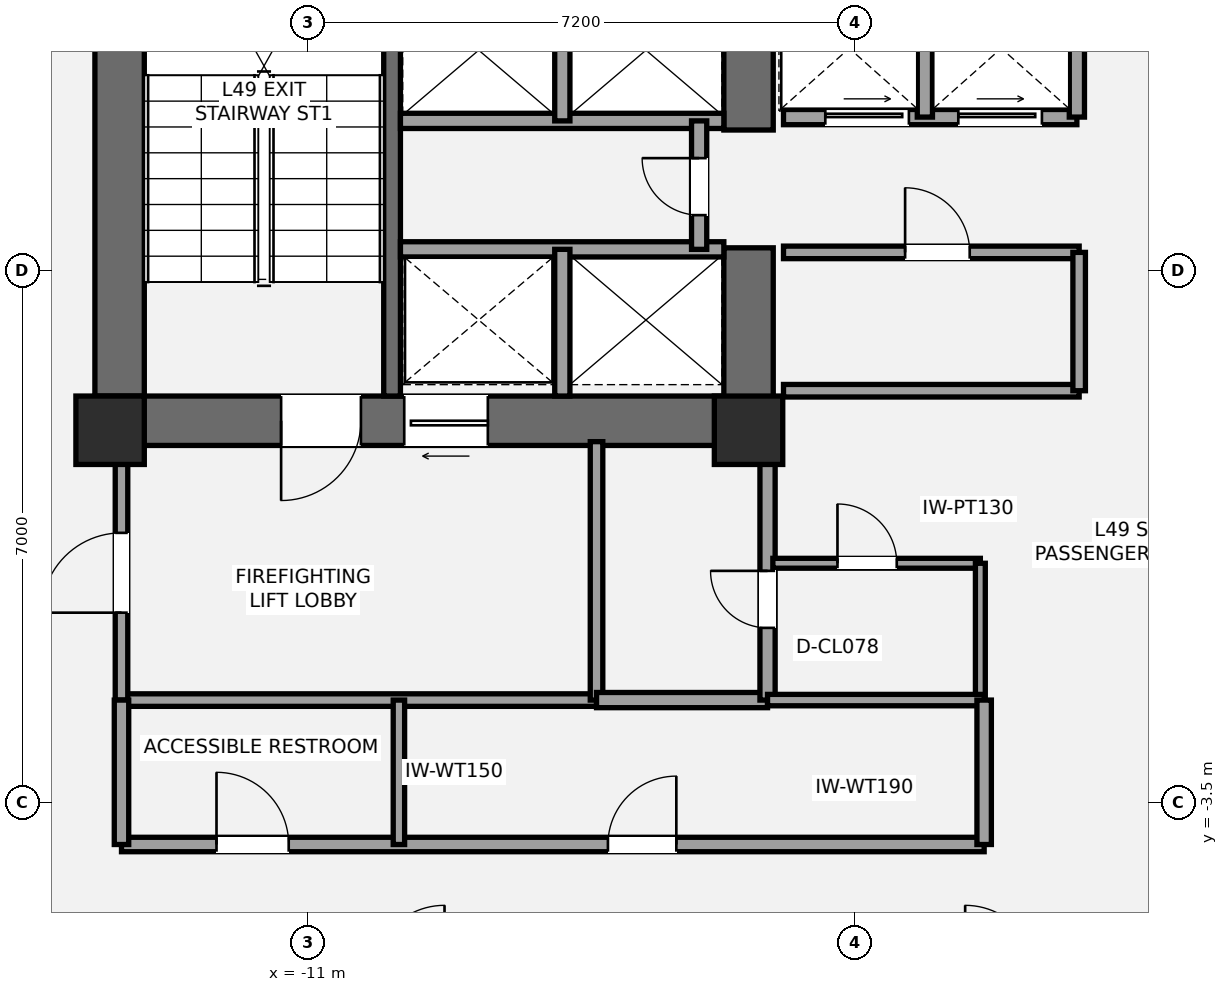
"""IFC4 building model, lengths in metres.
Left out: names, types, materials, properties, quantities, classifications, styles, units other than length and angle.
Written with IfcOpenShell. Run it as: python <this file> out.ifc"""

import sys

from ifc_helpers import new_model, si_unit, direction, frame, frame_2d, origin, origin_2d, place, context, subcontext, project, spatial, rectangle, extrude, element, fill, save


model = new_model("IFC4")
c1 = context("Model", 3, precision=1e-05, world=origin(), true_north=direction((0.0, 1.0)))
c2 = subcontext(c1, "Body", "Model", "MODEL_VIEW")
j1 = project(units=[si_unit("LENGTHUNIT", "METRE"), si_unit("PLANEANGLEUNIT", "RADIAN")], contexts=[c1])
p1 = place(None, origin())
s1 = spatial("IfcSite", under=j1, at=p1, CompositionType="ELEMENT")
p2 = place(p1, origin())
s2 = spatial("IfcBuilding", under=s1, at=p2, CompositionType="ELEMENT")
p3 = place(p2, frame((0.0, 0.0, 179.0)))
s3 = spatial("IfcBuildingStorey", under=s2, at=p3, CompositionType="ELEMENT", Elevation=179.0)
p4 = place(p3, frame((-13.475, 1.2, 0.0), z_axis=(0.0, 0.0, 1.0), x_axis=(0.0, 1.0, 0.0)))
e1 = element("IfcWall", 1, at=p4, inside=s3, PredefinedType="SHEAR", context=c2, shape_type="SweptSolid", body=[
    extrude(rectangle(XDim=8.45, YDim=0.65, at=frame_2d((4.225, 0.0))), origin(), (0.0, 0.0, 1.0), 3.2),
])
p5 = place(p3, frame((-4.875, 1.525, 0.0), z_axis=(0.0, 0.0, 1.0), x_axis=(-1.0, 0.0, 0.0)))
e2 = element("IfcWall", 2, at=p5, inside=s3, PredefinedType="SHEAR", context=c2, shape_type="SweptSolid", body=[
    extrude(rectangle(XDim=8.925, YDim=0.65, at=frame_2d((4.462, 0.0))), origin(), (0.0, 0.0, 1.0), 3.2),
])
p6 = place(p5, frame((5.425, 0.0, 0.0)))
e3 = element("IfcOpeningElement", 3, at=p6, cuts=e2, PredefinedType="OPENING", context=c2, shape_type="SweptSolid", body=[
    extrude(rectangle(XDim=1.05, YDim=2.15, at=frame_2d((0.525, 1.075))), frame((0.0, 0.335, 0.0), z_axis=(0.0, -1.0, 0.0), x_axis=(1.0, 0.0, 0.0)), (0.0, 0.0, 1.0), 0.67),
])
p7 = place(p5, frame((3.755, 0.0, 0.0)))
e4 = element("IfcOpeningElement", 4, at=p7, cuts=e2, PredefinedType="OPENING", context=c2, shape_type="SweptSolid", body=[
    extrude(rectangle(XDim=1.1, YDim=2.2, at=frame_2d((0.55, 1.1))), frame((0.0, 0.335, 0.0), z_axis=(0.0, -1.0, 0.0), x_axis=(1.0, 0.0, 0.0)), (0.0, 0.0, 1.0), 0.67),
])
p8 = place(p3, frame((-5.2, 1.2, 0.0), z_axis=(0.0, 0.0, 1.0), x_axis=(0.0, 1.0, 0.0)))
e5 = element("IfcWall", 5, at=p8, inside=s3, PredefinedType="SHEAR", context=c2, shape_type="SweptSolid", body=[
    extrude(rectangle(XDim=2.6, YDim=0.65, at=frame_2d((1.3, 0.0))), origin(), (0.0, 0.0, 1.0), 3.2),
])
p9 = place(p3, frame((-5.2, 5.35, 0.0), z_axis=(0.0, 0.0, 1.0), x_axis=(0.0, 1.0, 0.0)))
e6 = element("IfcWall", 6, at=p9, inside=s3, PredefinedType="SHEAR", context=c2, shape_type="SweptSolid", body=[
    extrude(rectangle(XDim=2.0, YDim=0.65, at=frame_2d((1.0, 0.0))), origin(), (0.0, 0.0, 1.0), 3.2),
])
p10 = place(p3, frame((-9.89, 1.85, 0.0), z_axis=(0.0, 0.0, 1.0), x_axis=(0.0, 1.0, 0.0)))
e7 = element("IfcWall", 7, at=p10, inside=s3, PredefinedType="SHEAR", context=c2, shape_type="SweptSolid", body=[
    extrude(rectangle(XDim=7.15, YDim=0.22, at=frame_2d((3.575, 0.0))), origin(), (0.0, 0.0, 1.0), 3.2),
])
for number, where, z_axis, x_axis in (
    (8, (-13.6, 1.4, 0.0), (0.0, 0.0, 1.0), (1.0, 0.0, 0.0)),
    (9, (-5.2, 1.4, 0.0), (0.0, 0.0, 1.0), (1.0, 0.0, 0.0)),
):
    element("IfcColumn", number, at=place(p3, frame(where, z_axis=z_axis, x_axis=x_axis)), inside=s3, PredefinedType="COLUMN", context=c2, shape_type="SweptSolid", body=[
        extrude(rectangle(XDim=0.9, YDim=0.9, at=origin_2d()), origin(), (0.0, 0.0, 1.0), 3.2),
    ])
p11 = place(p3, frame((-13.45, -2.15, 0.0), z_axis=(0.0, 0.0, 1.0), x_axis=(1.0, 0.0, 0.0)))
e10 = element("IfcWall", 10, at=p11, inside=s3, PredefinedType="PARTITIONING", context=c2, shape_type="SweptSolid", body=[
    extrude(rectangle(XDim=6.25, YDim=0.165, at=frame_2d((3.125, 0.0))), origin(), (0.0, 0.0, 1.0), 3.02),
])
p12 = place(p3, frame((-13.45, -2.15, 0.0), z_axis=(0.0, 0.0, 1.0), x_axis=(0.0, 1.0, 0.0)))
e11 = element("IfcWall", 11, at=p12, inside=s3, PredefinedType="PARTITIONING", context=c2, shape_type="SweptSolid", body=[
    extrude(rectangle(XDim=3.4, YDim=0.165, at=frame_2d((1.7, 0.0))), origin(), (0.0, 0.0, 1.0), 2.473),
])
p13 = place(p12, frame((1.15, 0.0, 0.0)))
e12 = element("IfcOpeningElement", 12, at=p13, cuts=e11, PredefinedType="OPENING", context=c2, shape_type="SweptSolid", body=[
    extrude(rectangle(XDim=1.05, YDim=2.15, at=frame_2d((0.525, 1.075))), frame((0.0, 0.093, 0.0), z_axis=(0.0, -1.0, 0.0), x_axis=(1.0, 0.0, 0.0)), (0.0, 0.0, 1.0), 0.185),
])
p14 = place(p3, frame((-7.2, -2.15, 0.0), z_axis=(0.0, 0.0, 1.0), x_axis=(0.0, 1.0, 0.0)))
e13 = element("IfcWall", 13, at=p14, inside=s3, PredefinedType="PARTITIONING", context=c2, shape_type="SweptSolid", body=[
    extrude(rectangle(XDim=3.4, YDim=0.165, at=frame_2d((1.7, 0.0))), origin(), (0.0, 0.0, 1.0), 2.473),
])
p15 = place(p3, frame((-7.2, -2.15, 0.0), z_axis=(0.0, 0.0, 1.0), x_axis=(1.0, 0.0, 0.0)))
e14 = element("IfcWall", 14, at=p15, inside=s3, PredefinedType="SOLIDWALL", context=c2, shape_type="SweptSolid", body=[
    extrude(rectangle(XDim=2.25, YDim=0.2, at=frame_2d((1.125, 0.0))), origin(), (0.0, 0.0, 1.0), 3.02),
])
p16 = place(p3, frame((-4.95, -2.15, 0.0), z_axis=(0.0, 0.0, 1.0), x_axis=(0.0, 1.0, 0.0)))
e15 = element("IfcWall", 15, at=p16, inside=s3, PredefinedType="SOLIDWALL", context=c2, shape_type="SweptSolid", body=[
    extrude(rectangle(XDim=3.4, YDim=0.2, at=frame_2d((1.7, 0.0))), origin(), (0.0, 0.0, 1.0), 2.473),
])
p17 = place(p16, frame((0.95, 0.0, 0.0)))
e16 = element("IfcOpeningElement", 16, at=p17, cuts=e15, PredefinedType="OPENING", context=c2, shape_type="SweptSolid", body=[
    extrude(rectangle(XDim=0.75, YDim=2.1, at=frame_2d((0.375, 1.05))), frame((0.0, 0.11, 0.0), z_axis=(0.0, -1.0, 0.0), x_axis=(1.0, 0.0, 0.0)), (0.0, 0.0, 1.0), 0.22),
])
p18 = place(p3, frame((-4.88, -0.35, 0.0), z_axis=(0.0, 0.0, 1.0), x_axis=(1.0, 0.0, 0.0)))
e17 = element("IfcWall", 17, at=p18, inside=s3, PredefinedType="PARTITIONING", context=c2, shape_type="SweptSolid", body=[
    extrude(rectangle(XDim=2.73, YDim=0.13, at=frame_2d((1.365, 0.0))), origin(), (0.0, 0.0, 1.0), 3.02),
])
p19 = place(p18, frame((0.85, 0.0, 0.0)))
e18 = element("IfcOpeningElement", 18, at=p19, cuts=e17, PredefinedType="OPENING", context=c2, shape_type="SweptSolid", body=[
    extrude(rectangle(XDim=0.78, YDim=2.1, at=frame_2d((0.39, 1.05))), frame((0.0, 0.075, 0.0), z_axis=(0.0, -1.0, 0.0), x_axis=(1.0, 0.0, 0.0)), (0.0, 0.0, 1.0), 0.15),
])
p20 = place(p3, frame((-2.15, -2.15, 0.0), z_axis=(0.0, 0.0, 1.0), x_axis=(0.0, 1.0, 0.0)))
e19 = element("IfcWall", 19, at=p20, inside=s3, PredefinedType="PARTITIONING", context=c2, shape_type="SweptSolid", body=[
    extrude(rectangle(XDim=1.8, YDim=0.13, at=frame_2d((0.9, 0.0))), origin(), (0.0, 0.0, 1.0), 3.02),
])
p21 = place(p3, frame((-9.78, 3.78, 0.0), z_axis=(0.0, 0.0, 1.0), x_axis=(1.0, 0.0, 0.0)))
e20 = element("IfcWall", 20, at=p21, inside=s3, PredefinedType="SOLIDWALL", context=c2, shape_type="SweptSolid", body=[
    extrude(rectangle(XDim=4.255, YDim=0.2, at=frame_2d((2.127, 0.0))), origin(), (0.0, 0.0, 1.0), 3.02),
])
p22 = place(p3, frame((-7.65, 1.85, 0.0), z_axis=(0.0, 0.0, 1.0), x_axis=(0.0, 1.0, 0.0)))
e21 = element("IfcWall", 21, at=p22, inside=s3, PredefinedType="SOLIDWALL", context=c2, shape_type="SweptSolid", body=[
    extrude(rectangle(XDim=1.93, YDim=0.2, at=frame_2d((0.965, 0.0))), origin(), (0.0, 0.0, 1.0), 3.02),
])
p23 = place(p3, frame((-9.78, 5.47, 0.0), z_axis=(0.0, 0.0, 1.0), x_axis=(1.0, 0.0, 0.0)))
e22 = element("IfcWall", 22, at=p23, inside=s3, PredefinedType="SOLIDWALL", context=c2, shape_type="SweptSolid", body=[
    extrude(rectangle(XDim=4.255, YDim=0.2, at=frame_2d((2.127, 0.0))), origin(), (0.0, 0.0, 1.0), 3.02),
])
p24 = place(p3, frame((-7.65, 5.47, 0.0), z_axis=(0.0, 0.0, 1.0), x_axis=(0.0, 1.0, 0.0)))
e23 = element("IfcWall", 23, at=p24, inside=s3, PredefinedType="SOLIDWALL", context=c2, shape_type="SweptSolid", body=[
    extrude(rectangle(XDim=1.86, YDim=0.2, at=frame_2d((0.93, 0.0))), origin(), (0.0, 0.0, 1.0), 3.02),
])
p25 = place(p3, frame((-5.85, 3.78, 0.0), z_axis=(0.0, 0.0, 1.0), x_axis=(0.0, 1.0, 0.0)))
e24 = element("IfcWall", 24, at=p25, inside=s3, PredefinedType="SOLIDWALL", context=c2, shape_type="SweptSolid", body=[
    extrude(rectangle(XDim=1.69, YDim=0.2, at=frame_2d((0.845, 0.0))), origin(), (0.0, 0.0, 1.0), 3.02),
])
p26 = place(p25, frame((0.45, 0.0, 0.0)))
e25 = element("IfcOpeningElement", 25, at=p26, cuts=e24, PredefinedType="OPENING", context=c2, shape_type="SweptSolid", body=[
    extrude(rectangle(XDim=0.75, YDim=2.1, at=frame_2d((0.375, 1.05))), frame((0.0, 0.11, 0.0), z_axis=(0.0, -1.0, 0.0), x_axis=(1.0, 0.0, 0.0)), (0.0, 0.0, 1.0), 0.22),
])
p27 = place(p3, frame((-4.74, 1.92, 0.0), z_axis=(0.0, 0.0, 1.0), x_axis=(1.0, 0.0, 0.0)))
e26 = element("IfcWall", 26, at=p27, inside=s3, PredefinedType="PARTITIONING", context=c2, shape_type="SweptSolid", body=[
    extrude(rectangle(XDim=3.89, YDim=0.165, at=frame_2d((1.945, 0.0))), origin(), (0.0, 0.0, 1.0), 2.16),
])
p28 = place(p3, frame((-4.74, 3.74, 0.0), z_axis=(0.0, 0.0, 1.0), x_axis=(1.0, 0.0, 0.0)))
e27 = element("IfcWall", 27, at=p28, inside=s3, PredefinedType="PARTITIONING", context=c2, shape_type="SweptSolid", body=[
    extrude(rectangle(XDim=3.89, YDim=0.165, at=frame_2d((1.945, 0.0))), origin(), (0.0, 0.0, 1.0), 3.02),
])
p29 = place(p28, frame((1.6, 0.0, 0.0)))
e28 = element("IfcOpeningElement", 28, at=p29, cuts=e27, PredefinedType="OPENING", context=c2, shape_type="SweptSolid", body=[
    extrude(rectangle(XDim=0.85, YDim=2.1, at=frame_2d((0.425, 1.05))), frame((0.0, 0.093, 0.0), z_axis=(0.0, -1.0, 0.0), x_axis=(1.0, 0.0, 0.0)), (0.0, 0.0, 1.0), 0.185),
])
p30 = place(p3, frame((-0.85, 1.92, 0.0), z_axis=(0.0, 0.0, 1.0), x_axis=(0.0, 1.0, 0.0)))
e29 = element("IfcWall", 29, at=p30, inside=s3, PredefinedType="PARTITIONING", context=c2, shape_type="SweptSolid", body=[
    extrude(rectangle(XDim=1.82, YDim=0.165, at=frame_2d((0.91, 0.0))), origin(), (0.0, 0.0, 1.0), 3.02),
])
p31 = place(p3, frame((-4.74, 5.52, 0.0), z_axis=(0.0, 0.0, 1.0), x_axis=(1.0, 0.0, 0.0)))
e30 = element("IfcWall", 30, at=p31, inside=s3, PredefinedType="SOLIDWALL", context=c2, shape_type="SweptSolid", body=[
    extrude(rectangle(XDim=3.86, YDim=0.2, at=frame_2d((1.93, 0.0))), origin(), (0.0, 0.0, 1.0), 3.02),
])
p32 = place(p31, frame((0.55, 0.0, 0.0)))
e31 = element("IfcOpeningElement", 31, at=p32, cuts=e30, PredefinedType="OPENING", context=c2, shape_type="SweptSolid", body=[
    extrude(rectangle(XDim=1.1, YDim=2.2, at=frame_2d((0.55, 1.1))), frame((0.0, 0.11, 0.0), z_axis=(0.0, -1.0, 0.0), x_axis=(1.0, 0.0, 0.0)), (0.0, 0.0, 1.0), 0.22),
])
p33 = place(p31, frame((2.3, 0.0, 0.0)))
e32 = element("IfcOpeningElement", 32, at=p33, cuts=e30, PredefinedType="OPENING", context=c2, shape_type="SweptSolid", body=[
    extrude(rectangle(XDim=1.1, YDim=2.2, at=frame_2d((0.55, 1.1))), frame((0.0, 0.11, 0.0), z_axis=(0.0, -1.0, 0.0), x_axis=(1.0, 0.0, 0.0)), (0.0, 0.0, 1.0), 0.22),
])
for number, where, z_axis, x_axis in (
    (33, (-2.88, 5.52, 0.0), (0.0, 0.0, 1.0), (0.0, 1.0, 0.0)),
    (34, (-0.88, 5.52, 0.0), (0.0, 0.0, 1.0), (0.0, 1.0, 0.0)),
):
    element("IfcWall", number, at=place(p3, frame(where, z_axis=z_axis, x_axis=x_axis)), inside=s3, PredefinedType="SOLIDWALL", context=c2, shape_type="SweptSolid", body=[
        extrude(rectangle(XDim=1.81, YDim=0.2, at=frame_2d((0.905, 0.0))), origin(), (0.0, 0.0, 1.0), 3.02),
    ])
p34 = place(p3, frame((-13.45, -4.05, 0.0), z_axis=(0.0, 0.0, 1.0), x_axis=(1.0, 0.0, 0.0)))
e35 = element("IfcWall", 35, at=p34, inside=s3, PredefinedType="PLUMBINGWALL", context=c2, shape_type="SweptSolid", body=[
    extrude(rectangle(XDim=11.35, YDim=0.19, at=frame_2d((5.675, 0.0))), origin(), (0.0, 0.0, 1.0), 2.473),
])
p35 = place(p34, frame((1.25, 0.0, 0.0)))
e36 = element("IfcOpeningElement", 36, at=p35, cuts=e35, PredefinedType="OPENING", context=c2, shape_type="SweptSolid", body=[
    extrude(rectangle(XDim=0.95, YDim=2.15, at=frame_2d((0.475, 1.075))), frame((0.0, 0.105, 0.0), z_axis=(0.0, -1.0, 0.0), x_axis=(1.0, 0.0, 0.0)), (0.0, 0.0, 1.0), 0.21),
])
p36 = place(p34, frame((6.4, 0.0, 0.0)))
e37 = element("IfcOpeningElement", 37, at=p36, cuts=e35, PredefinedType="OPENING", context=c2, shape_type="SweptSolid", body=[
    extrude(rectangle(XDim=0.9, YDim=2.1, at=frame_2d((0.45, 1.05))), frame((0.0, 0.105, 0.0), z_axis=(0.0, -1.0, 0.0), x_axis=(1.0, 0.0, 0.0)), (0.0, 0.0, 1.0), 0.21),
])
p37 = place(p3, frame((-4.95, -2.15, 0.0), z_axis=(0.0, 0.0, 1.0), x_axis=(1.0, 0.0, 0.0)))
e38 = element("IfcWall", 38, at=p37, inside=s3, PredefinedType="PLUMBINGWALL", context=c2, shape_type="SweptSolid", body=[
    extrude(rectangle(XDim=2.85, YDim=0.15, at=frame_2d((1.425, 0.0))), origin(), (0.0, 0.0, 1.0), 2.473),
])
p38 = place(p3, frame((-13.45, -4.05, 0.0), z_axis=(0.0, 0.0, 1.0), x_axis=(0.0, 1.0, 0.0)))
e39 = element("IfcWall", 39, at=p38, inside=s3, PredefinedType="PLUMBINGWALL", context=c2, shape_type="SweptSolid", body=[
    extrude(rectangle(XDim=1.9, YDim=0.19, at=frame_2d((0.95, 0.0))), origin(), (0.0, 0.0, 1.0), 2.473),
])
p39 = place(p3, frame((-2.1, -4.05, 0.0), z_axis=(0.0, 0.0, 1.0), x_axis=(0.0, 1.0, 0.0)))
e40 = element("IfcWall", 40, at=p39, inside=s3, PredefinedType="PLUMBINGWALL", context=c2, shape_type="SweptSolid", body=[
    extrude(rectangle(XDim=1.9, YDim=0.19, at=frame_2d((0.95, 0.0))), origin(), (0.0, 0.0, 1.0), 3.02),
])
p40 = place(p3, frame((-9.8, -4.05, 0.0), z_axis=(0.0, 0.0, 1.0), x_axis=(0.0, 1.0, 0.0)))
e41 = element("IfcWall", 41, at=p40, inside=s3, PredefinedType="PLUMBINGWALL", context=c2, shape_type="SweptSolid", body=[
    extrude(rectangle(XDim=1.9, YDim=0.15, at=frame_2d((0.95, 0.0))), origin(), (0.0, 0.0, 1.0), 3.02),
])
p41 = place(p6, origin())
e42 = element("IfcDoor", 42, at=p41, inside=s3, OperationType="SINGLE_SWING_RIGHT", PredefinedType="DOOR", context=c2, shape_type="SweptSolid", body=[
    extrude(rectangle(XDim=1.05, YDim=2.15, at=frame_2d((0.525, 1.075))), frame((0.0, 0.025, 0.0), z_axis=(0.0, -1.0, 0.0), x_axis=(1.0, 0.0, 0.0)), (0.0, 0.0, 1.0), 0.05),
])
fill(e3, e42)
p42 = place(p13, origin())
e43 = element("IfcDoor", 43, at=p42, inside=s3, OperationType="SINGLE_SWING_LEFT", PredefinedType="DOOR", context=c2, shape_type="SweptSolid", body=[
    extrude(rectangle(XDim=1.05, YDim=2.15, at=frame_2d((0.525, 1.075))), frame((0.0, 0.025, 0.0), z_axis=(0.0, -1.0, 0.0), x_axis=(1.0, 0.0, 0.0)), (0.0, 0.0, 1.0), 0.05),
])
fill(e12, e43)
p43 = place(p17, origin())
e44 = element("IfcDoor", 44, at=p43, inside=s3, OperationType="SINGLE_SWING_RIGHT", PredefinedType="DOOR", context=c2, shape_type="SweptSolid", body=[
    extrude(rectangle(XDim=0.75, YDim=2.1, at=frame_2d((0.375, 1.05))), frame((0.0, 0.025, 0.0), z_axis=(0.0, -1.0, 0.0), x_axis=(1.0, 0.0, 0.0)), (0.0, 0.0, 1.0), 0.05),
])
fill(e16, e44)
p44 = place(p19, origin())
e45 = element("IfcDoor", 45, at=p44, inside=s3, OperationType="SINGLE_SWING_LEFT", PredefinedType="DOOR", context=c2, shape_type="SweptSolid", body=[
    extrude(rectangle(XDim=0.78, YDim=2.1, at=frame_2d((0.39, 1.05))), frame((0.0, 0.025, 0.0), z_axis=(0.0, -1.0, 0.0), x_axis=(1.0, 0.0, 0.0)), (0.0, 0.0, 1.0), 0.05),
])
fill(e18, e45)
p45 = place(p7, origin())
e46 = element("IfcDoor", 46, at=p45, inside=s3, OperationType="SLIDING_TO_LEFT", PredefinedType="DOOR", context=c2, shape_type="SweptSolid", body=[
    extrude(rectangle(XDim=1.1, YDim=2.2, at=frame_2d((0.55, 1.1))), frame((0.0, 0.025, 0.0), z_axis=(0.0, -1.0, 0.0), x_axis=(1.0, 0.0, 0.0)), (0.0, 0.0, 1.0), 0.05),
])
fill(e4, e46)
p46 = place(p26, origin())
e47 = element("IfcDoor", 47, at=p46, inside=s3, OperationType="SINGLE_SWING_RIGHT", PredefinedType="DOOR", context=c2, shape_type="SweptSolid", body=[
    extrude(rectangle(XDim=0.75, YDim=2.1, at=frame_2d((0.375, 1.05))), frame((0.0, 0.025, 0.0), z_axis=(0.0, -1.0, 0.0), x_axis=(1.0, 0.0, 0.0)), (0.0, 0.0, 1.0), 0.05),
])
fill(e25, e47)
p47 = place(p29, origin())
e48 = element("IfcDoor", 48, at=p47, inside=s3, OperationType="SINGLE_SWING_LEFT", PredefinedType="DOOR", context=c2, shape_type="SweptSolid", body=[
    extrude(rectangle(XDim=0.85, YDim=2.1, at=frame_2d((0.425, 1.05))), frame((0.0, 0.025, 0.0), z_axis=(0.0, -1.0, 0.0), x_axis=(1.0, 0.0, 0.0)), (0.0, 0.0, 1.0), 0.05),
])
fill(e28, e48)
p48 = place(p32, origin())
e49 = element("IfcDoor", 49, at=p48, inside=s3, OperationType="SLIDING_TO_LEFT", PredefinedType="DOOR", context=c2, shape_type="SweptSolid", body=[
    extrude(rectangle(XDim=1.1, YDim=2.2, at=frame_2d((0.55, 1.1))), frame((0.0, 0.025, 0.0), z_axis=(0.0, -1.0, 0.0), x_axis=(1.0, 0.0, 0.0)), (0.0, 0.0, 1.0), 0.05),
])
fill(e31, e49)
p49 = place(p33, origin())
e50 = element("IfcDoor", 50, at=p49, inside=s3, OperationType="SLIDING_TO_LEFT", PredefinedType="DOOR", context=c2, shape_type="SweptSolid", body=[
    extrude(rectangle(XDim=1.1, YDim=2.2, at=frame_2d((0.55, 1.1))), frame((0.0, 0.025, 0.0), z_axis=(0.0, -1.0, 0.0), x_axis=(1.0, 0.0, 0.0)), (0.0, 0.0, 1.0), 0.05),
])
fill(e32, e50)
p50 = place(p35, origin())
e51 = element("IfcDoor", 51, at=p50, inside=s3, OperationType="SINGLE_SWING_LEFT", PredefinedType="DOOR", context=c2, shape_type="SweptSolid", body=[
    extrude(rectangle(XDim=0.95, YDim=2.15, at=frame_2d((0.475, 1.075))), frame((0.0, 0.025, 0.0), z_axis=(0.0, -1.0, 0.0), x_axis=(1.0, 0.0, 0.0)), (0.0, 0.0, 1.0), 0.05),
])
fill(e36, e51)
p51 = place(p36, origin())
e52 = element("IfcDoor", 52, at=p51, inside=s3, OperationType="SINGLE_SWING_RIGHT", PredefinedType="DOOR", context=c2, shape_type="SweptSolid", body=[
    extrude(rectangle(XDim=0.9, YDim=2.1, at=frame_2d((0.45, 1.05))), frame((0.0, 0.025, 0.0), z_axis=(0.0, -1.0, 0.0), x_axis=(1.0, 0.0, 0.0)), (0.0, 0.0, 1.0), 0.05),
])
fill(e37, e52)
save(model, sys.argv[1])
